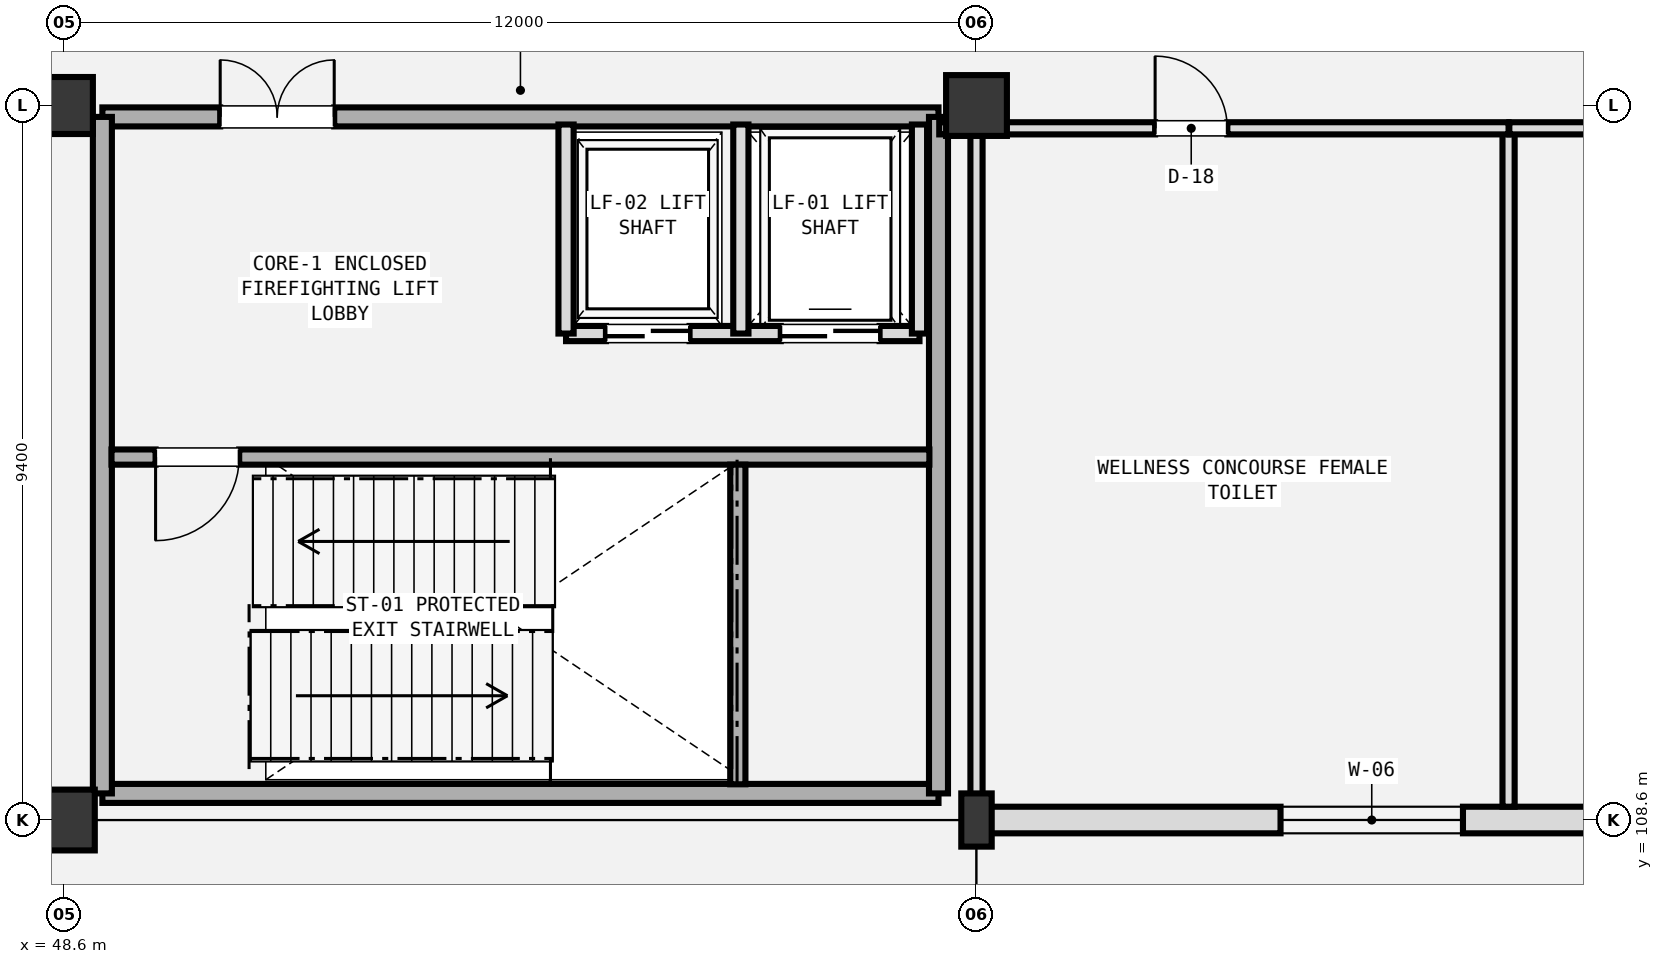
"""IFC4 building model, lengths in metres.
Left out: names, types, materials, properties, quantities, classifications, styles, units other than length and angle.
Written with IfcOpenShell. Run it as: python <this file> out.ifc"""

import sys

from ifc_helpers import new_model, si_unit, direction, frame, frame_2d, origin, origin_2d, place, context, subcontext, project, spatial, rectangle, extrude, element, fill, save


model = new_model("IFC4")
c1 = context("Model", 3, precision=1e-05, world=origin(), true_north=direction((0.0, 1.0)))
c2 = subcontext(c1, "Body", "Model", "MODEL_VIEW")
j1 = project(units=[si_unit("LENGTHUNIT", "METRE"), si_unit("PLANEANGLEUNIT", "RADIAN")], contexts=[c1])
p1 = place(None, origin())
s1 = spatial("IfcSite", under=j1, at=p1, CompositionType="ELEMENT")
p2 = place(p1, origin())
s2 = spatial("IfcBuilding", under=s1, at=p2, CompositionType="ELEMENT")
p3 = place(p2, origin())
s3 = spatial("IfcBuildingStorey", under=s2, at=p3, CompositionType="ELEMENT", Elevation=0.0)
p4 = place(p3, frame((48.6, 108.6, 0.0), z_axis=(0.0, 0.0, 1.0), x_axis=(1.0, 0.0, 0.0)))
e1 = element("IfcColumn", 1, at=p4, inside=s3, PredefinedType="COLUMN", context=c2, shape_type="SweptSolid", body=[
    extrude(rectangle(XDim=0.8, YDim=0.8, at=origin_2d()), origin(), (0.0, 0.0, 1.0), 5.4),
])
p5 = place(p3, frame((48.6, 118.0, 0.0), z_axis=(0.0, 0.0, 1.0), x_axis=(1.0, 0.0, 0.0)))
e2 = element("IfcColumn", 2, at=p5, inside=s3, PredefinedType="COLUMN", context=c2, shape_type="SweptSolid", body=[
    extrude(rectangle(XDim=0.75, YDim=0.75, at=origin_2d()), origin(), (0.0, 0.0, 1.0), 5.4),
])
p6 = place(p3, frame((60.6, 108.6, 0.0), z_axis=(0.0, 0.0, 1.0), x_axis=(1.0, 0.0, 0.0)))
e3 = element("IfcColumn", 3, at=p6, inside=s3, PredefinedType="PILASTER", context=c2, shape_type="SweptSolid", body=[
    extrude(rectangle(XDim=0.4, YDim=0.7, at=origin_2d()), origin(), (0.0, 0.0, 1.0), 5.4),
])
p7 = place(p3, frame((60.6, 118.0, 0.0), z_axis=(0.0, 0.0, 1.0), x_axis=(1.0, 0.0, 0.0)))
e4 = element("IfcColumn", 4, at=p7, inside=s3, PredefinedType="COLUMN", context=c2, shape_type="SweptSolid", body=[
    extrude(rectangle(XDim=0.8, YDim=0.8, at=origin_2d()), origin(), (0.0, 0.0, 1.0), 5.4),
])
p8 = place(p3, frame((60.6, 108.6, 0.0), z_axis=(0.0, 0.0, 1.0), x_axis=(1.0, 0.0, 0.0)))
e5 = element("IfcWall", 5, at=p8, inside=s3, PredefinedType="SOLIDWALL", context=c2, shape_type="SweptSolid", body=[
    extrude(rectangle(XDim=95.4, YDim=0.35, at=frame_2d((47.7, 0.0))), origin(), (0.0, 0.0, 1.0), 4.53),
])
p9 = place(p8, frame((42.0, 0.0, 0.0)))
e6 = element("IfcOpeningElement", 6, at=p9, cuts=e5, PredefinedType="OPENING", context=c2, shape_type="SweptSolid", body=[
    extrude(rectangle(XDim=3.8, YDim=3.6, at=frame_2d((1.9, 1.8))), frame((0.0, 0.185, 0.0), z_axis=(0.0, -1.0, 0.0), x_axis=(1.0, 0.0, 0.0)), (0.0, 0.0, 1.0), 0.37),
])
p10 = place(p8, frame((84.6, 0.0, 0.0)))
e7 = element("IfcOpeningElement", 7, at=p10, cuts=e5, PredefinedType="OPENING", context=c2, shape_type="SweptSolid", body=[
    extrude(rectangle(XDim=1.8, YDim=2.3, at=frame_2d((0.9, 1.15))), frame((0.0, 0.185, 0.0), z_axis=(0.0, -1.0, 0.0), x_axis=(1.0, 0.0, 0.0)), (0.0, 0.0, 1.0), 0.37),
])
p11 = place(p8, frame((4.0, 0.0, 0.9)))
e8 = element("IfcOpeningElement", 8, at=p11, cuts=e5, PredefinedType="OPENING", context=c2, shape_type="SweptSolid", body=[
    extrude(rectangle(XDim=2.4, YDim=1.2, at=frame_2d((1.2, 0.6))), frame((0.0, 0.185, 0.0), z_axis=(0.0, -1.0, 0.0), x_axis=(1.0, 0.0, 0.0)), (0.0, 0.0, 1.0), 0.37),
])
p12 = place(p8, frame((14.0, 0.0, 0.9)))
e9 = element("IfcOpeningElement", 9, at=p12, cuts=e5, PredefinedType="OPENING", context=c2, shape_type="SweptSolid", body=[
    extrude(rectangle(XDim=2.0, YDim=1.2, at=frame_2d((1.0, 0.6))), frame((0.0, 0.185, 0.0), z_axis=(0.0, -1.0, 0.0), x_axis=(1.0, 0.0, 0.0)), (0.0, 0.0, 1.0), 0.37),
])
p13 = place(p8, frame((26.0, 0.0, 0.9)))
e10 = element("IfcOpeningElement", 10, at=p13, cuts=e5, PredefinedType="OPENING", context=c2, shape_type="SweptSolid", body=[
    extrude(rectangle(XDim=1.8, YDim=1.65, at=frame_2d((0.9, 0.825))), frame((0.0, 0.185, 0.0), z_axis=(0.0, -1.0, 0.0), x_axis=(1.0, 0.0, 0.0)), (0.0, 0.0, 1.0), 0.37),
])
p14 = place(p8, frame((54.0, 0.0, 0.9)))
e11 = element("IfcOpeningElement", 11, at=p14, cuts=e5, PredefinedType="OPENING", context=c2, shape_type="SweptSolid", body=[
    extrude(rectangle(XDim=1.35, YDim=1.65, at=frame_2d((0.675, 0.825))), frame((0.0, 0.185, 0.0), z_axis=(0.0, -1.0, 0.0), x_axis=(1.0, 0.0, 0.0)), (0.0, 0.0, 1.0), 0.37),
])
p15 = place(p8, frame((66.0, 0.0, 0.9)))
e12 = element("IfcOpeningElement", 12, at=p15, cuts=e5, PredefinedType="OPENING", context=c2, shape_type="SweptSolid", body=[
    extrude(rectangle(XDim=0.9, YDim=1.5, at=frame_2d((0.45, 0.75))), frame((0.0, 0.185, 0.0), z_axis=(0.0, -1.0, 0.0), x_axis=(1.0, 0.0, 0.0)), (0.0, 0.0, 1.0), 0.37),
])
p16 = place(p3, frame((49.1, 108.95, 0.0), z_axis=(0.0, 0.0, 1.0), x_axis=(1.0, 0.0, 0.0)))
e13 = element("IfcWall", 13, at=p16, inside=s3, PredefinedType="SHEAR", context=c2, shape_type="SweptSolid", body=[
    extrude(rectangle(XDim=11.0, YDim=0.25, at=frame_2d((5.5, 0.0))), origin(), (0.0, 0.0, 1.0), 5.08),
])
p17 = place(p3, frame((49.1, 117.85, 0.0), z_axis=(0.0, 0.0, 1.0), x_axis=(1.0, 0.0, 0.0)))
e14 = element("IfcWall", 14, at=p17, inside=s3, PredefinedType="SHEAR", context=c2, shape_type="SweptSolid", body=[
    extrude(rectangle(XDim=11.0, YDim=0.25, at=frame_2d((5.5, 0.0))), origin(), (0.0, 0.0, 1.0), 5.08),
])
p18 = place(p17, frame((1.55, 0.0, 0.0)))
e15 = element("IfcOpeningElement", 15, at=p18, cuts=e14, PredefinedType="OPENING", context=c2, shape_type="SweptSolid", body=[
    extrude(rectangle(XDim=1.5, YDim=2.2, at=frame_2d((0.75, 1.1))), frame((0.0, 0.135, 0.0), z_axis=(0.0, -1.0, 0.0), x_axis=(1.0, 0.0, 0.0)), (0.0, 0.0, 1.0), 0.27),
])
for number, where, z_axis, x_axis in (
    (16, (49.1, 108.95, 0.0), (0.0, 0.0, 1.0), (0.0, 1.0, 0.0)),
    (17, (60.1, 108.95, 0.0), (0.0, 0.0, 1.0), (0.0, 1.0, 0.0)),
):
    element("IfcWall", number, at=place(p3, frame(where, z_axis=z_axis, x_axis=x_axis)), inside=s3, PredefinedType="SHEAR", context=c2, shape_type="SweptSolid", body=[
        extrude(rectangle(XDim=8.9, YDim=0.25, at=frame_2d((4.45, 0.0))), origin(), (0.0, 0.0, 1.0), 5.08),
    ])
p19 = place(p3, frame((49.22, 113.375, 0.0), z_axis=(0.0, 0.0, 1.0), x_axis=(1.0, 0.0, 0.0)))
e18 = element("IfcWall", 18, at=p19, inside=s3, PredefinedType="SHEAR", context=c2, shape_type="SweptSolid", body=[
    extrude(rectangle(XDim=10.76, YDim=0.2, at=frame_2d((5.38, 0.0))), origin(), (0.0, 0.0, 1.0), 5.08),
])
p20 = place(p19, frame((0.58, 0.0, 0.0)))
e19 = element("IfcOpeningElement", 19, at=p20, cuts=e18, PredefinedType="OPENING", context=c2, shape_type="SweptSolid", body=[
    extrude(rectangle(XDim=1.1, YDim=2.2, at=frame_2d((0.55, 1.1))), frame((0.0, 0.11, 0.0), z_axis=(0.0, -1.0, 0.0), x_axis=(1.0, 0.0, 0.0)), (0.0, 0.0, 1.0), 0.22),
])
p21 = place(p3, frame((57.46, 109.07, 0.0), z_axis=(0.0, 0.0, 1.0), x_axis=(0.0, 1.0, 0.0)))
e20 = element("IfcWall", 20, at=p21, inside=s3, PredefinedType="SHEAR", context=c2, shape_type="SweptSolid", body=[
    extrude(rectangle(XDim=4.205, YDim=0.2, at=frame_2d((2.103, 0.0))), origin(), (0.0, 0.0, 1.0), 5.08),
])
p22 = place(p3, frame((55.2, 115.0, 0.0), z_axis=(0.0, 0.0, 1.0), x_axis=(1.0, 0.0, 0.0)))
e21 = element("IfcWall", 21, at=p22, inside=s3, PredefinedType="SOLIDWALL", context=c2, shape_type="SweptSolid", body=[
    extrude(rectangle(XDim=4.65, YDim=0.2, at=frame_2d((2.325, 0.0))), origin(), (0.0, 0.0, 1.0), 4.72),
])
p23 = place(p22, frame((2.825, 0.0, 0.0)))
e22 = element("IfcOpeningElement", 22, at=p23, cuts=e21, PredefinedType="OPENING", context=c2, shape_type="SweptSolid", body=[
    extrude(rectangle(XDim=1.3, YDim=2.3, at=frame_2d((0.65, 1.15))), frame((0.0, 0.11, 0.0), z_axis=(0.0, -1.0, 0.0), x_axis=(1.0, 0.0, 0.0)), (0.0, 0.0, 1.0), 0.22),
])
p24 = place(p22, frame((0.525, 0.0, 0.0)))
e23 = element("IfcOpeningElement", 23, at=p24, cuts=e21, PredefinedType="OPENING", context=c2, shape_type="SweptSolid", body=[
    extrude(rectangle(XDim=1.1, YDim=2.2, at=frame_2d((0.55, 1.1))), frame((0.0, 0.11, 0.0), z_axis=(0.0, -1.0, 0.0), x_axis=(1.0, 0.0, 0.0)), (0.0, 0.0, 1.0), 0.22),
])
for number, where, z_axis, x_axis in (
    (24, (57.5, 115.0, 0.0), (0.0, 0.0, 1.0), (0.0, 1.0, 0.0)),
    (25, (59.85, 115.0, 0.0), (0.0, 0.0, 1.0), (0.0, 1.0, 0.0)),
    (26, (55.2, 115.0, 0.0), (0.0, 0.0, 1.0), (0.0, 1.0, 0.0)),
):
    element("IfcWall", number, at=place(p3, frame(where, z_axis=z_axis, x_axis=x_axis)), inside=s3, PredefinedType="SOLIDWALL", context=c2, shape_type="SweptSolid", body=[
        extrude(rectangle(XDim=2.75, YDim=0.2, at=frame_2d((1.375, 0.0))), origin(), (0.0, 0.0, 1.0), 5.08),
    ])
for number, where, z_axis, x_axis in (
    (27, (60.6, 108.775, 0.0), (0.0, 0.0, 1.0), (0.0, 1.0, 0.0)),
    (28, (67.6, 108.775, 0.0), (0.0, 0.0, 1.0), (0.0, 1.0, 0.0)),
):
    element("IfcWall", number, at=place(p3, frame(where, z_axis=z_axis, x_axis=x_axis)), inside=s3, PredefinedType="PLUMBINGWALL", context=c2, shape_type="SweptSolid", body=[
        extrude(rectangle(XDim=8.925, YDim=0.16, at=frame_2d((4.462, 0.0))), origin(), (0.0, 0.0, 1.0), 3.9),
    ])
p25 = place(p3, frame((60.11, 117.7, 0.0), z_axis=(0.0, 0.0, 1.0), x_axis=(1.0, 0.0, 0.0)))
e29 = element("IfcWall", 29, at=p25, inside=s3, PredefinedType="PLUMBINGWALL", context=c2, shape_type="SweptSolid", body=[
    extrude(rectangle(XDim=7.49, YDim=0.16, at=frame_2d((3.745, 0.0))), origin(), (0.0, 0.0, 1.0), 3.9),
])
p26 = place(p25, frame((2.84, 0.0, 0.0)))
e30 = element("IfcOpeningElement", 30, at=p26, cuts=e29, PredefinedType="OPENING", context=c2, shape_type="SweptSolid", body=[
    extrude(rectangle(XDim=0.95, YDim=2.15, at=frame_2d((0.475, 1.075))), frame((0.0, 0.09, 0.0), z_axis=(0.0, -1.0, 0.0), x_axis=(1.0, 0.0, 0.0)), (0.0, 0.0, 1.0), 0.18),
])
p27 = place(p3, frame((67.61, 117.7, 0.0), z_axis=(0.0, 0.0, 1.0), x_axis=(1.0, 0.0, 0.0)))
e31 = element("IfcWall", 31, at=p27, inside=s3, PredefinedType="PLUMBINGWALL", context=c2, shape_type="SweptSolid", body=[
    extrude(rectangle(XDim=7.39, YDim=0.16, at=frame_2d((3.695, 0.0))), origin(), (0.0, 0.0, 1.0), 3.9),
])
p28 = place(p27, frame((2.99, 0.0, 0.0)))
e32 = element("IfcOpeningElement", 32, at=p28, cuts=e31, PredefinedType="OPENING", context=c2, shape_type="SweptSolid", body=[
    extrude(rectangle(XDim=0.95, YDim=2.15, at=frame_2d((0.475, 1.075))), frame((0.0, 0.09, 0.0), z_axis=(0.0, -1.0, 0.0), x_axis=(1.0, 0.0, 0.0)), (0.0, 0.0, 1.0), 0.18),
])
p29 = place(p11, frame((2.4, 0.0, 0.0), z_axis=(0.0, 0.0, 1.0), x_axis=(-1.0, 0.0, 0.0)))
e33 = element("IfcWindow", 33, at=p29, inside=s3, PartitioningType="DOUBLE_PANEL_HORIZONTAL", PredefinedType="WINDOW", context=c2, shape_type="SweptSolid", body=[
    extrude(rectangle(XDim=2.4, YDim=1.2, at=frame_2d((1.2, 0.6))), frame((0.0, 0.03, 0.0), z_axis=(0.0, -1.0, 0.0), x_axis=(1.0, 0.0, 0.0)), (0.0, 0.0, 1.0), 0.06),
])
fill(e8, e33)
p30 = place(p18, origin())
e34 = element("IfcDoor", 34, at=p30, inside=s3, OperationType="DOUBLE_DOOR_SINGLE_SWING", PredefinedType="DOOR", context=c2, shape_type="SweptSolid", body=[
    extrude(rectangle(XDim=1.5, YDim=2.2, at=frame_2d((0.75, 1.1))), frame((0.0, 0.025, 0.0), z_axis=(0.0, -1.0, 0.0), x_axis=(1.0, 0.0, 0.0)), (0.0, 0.0, 1.0), 0.05),
])
fill(e15, e34)
p31 = place(p20, frame((1.1, 0.0, 0.0), z_axis=(0.0, 0.0, 1.0), x_axis=(-1.0, 0.0, 0.0)))
e35 = element("IfcDoor", 35, at=p31, inside=s3, OperationType="SINGLE_SWING_RIGHT", PredefinedType="DOOR", context=c2, shape_type="SweptSolid", body=[
    extrude(rectangle(XDim=1.1, YDim=2.2, at=frame_2d((0.55, 1.1))), frame((0.0, 0.025, 0.0), z_axis=(0.0, -1.0, 0.0), x_axis=(1.0, 0.0, 0.0)), (0.0, 0.0, 1.0), 0.05),
])
fill(e19, e35)
p32 = place(p23, frame((1.3, 0.0, 0.0), z_axis=(0.0, 0.0, 1.0), x_axis=(-1.0, 0.0, 0.0)))
e36 = element("IfcDoor", 36, at=p32, inside=s3, OperationType="DOUBLE_DOOR_SLIDING", PredefinedType="DOOR", context=c2, shape_type="SweptSolid", body=[
    extrude(rectangle(XDim=1.3, YDim=2.3, at=frame_2d((0.65, 1.15))), frame((0.0, 0.025, 0.0), z_axis=(0.0, -1.0, 0.0), x_axis=(1.0, 0.0, 0.0)), (0.0, 0.0, 1.0), 0.05),
])
fill(e22, e36)
p33 = place(p24, frame((1.1, 0.0, 0.0), z_axis=(0.0, 0.0, 1.0), x_axis=(-1.0, 0.0, 0.0)))
e37 = element("IfcDoor", 37, at=p33, inside=s3, OperationType="DOUBLE_DOOR_SLIDING", PredefinedType="DOOR", context=c2, shape_type="SweptSolid", body=[
    extrude(rectangle(XDim=1.1, YDim=2.2, at=frame_2d((0.55, 1.1))), frame((0.0, 0.025, 0.0), z_axis=(0.0, -1.0, 0.0), x_axis=(1.0, 0.0, 0.0)), (0.0, 0.0, 1.0), 0.05),
])
fill(e23, e37)
p34 = place(p26, origin())
e38 = element("IfcDoor", 38, at=p34, inside=s3, OperationType="SINGLE_SWING_LEFT", PredefinedType="DOOR", context=c2, shape_type="SweptSolid", body=[
    extrude(rectangle(XDim=0.95, YDim=2.15, at=frame_2d((0.475, 1.075))), frame((0.0, 0.025, 0.0), z_axis=(0.0, -1.0, 0.0), x_axis=(1.0, 0.0, 0.0)), (0.0, 0.0, 1.0), 0.05),
])
fill(e30, e38)
save(model, sys.argv[1])
